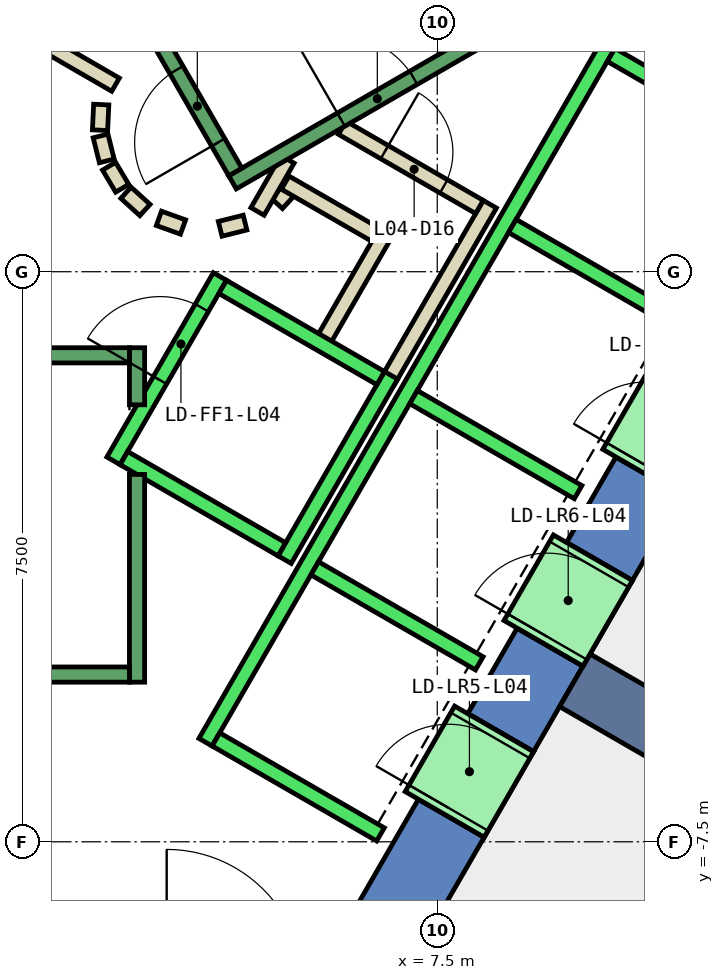
"""IFC4 building model, lengths in metres.
Left out: names, types, materials, properties, quantities, classifications, styles, units other than length and angle.
Written with IfcOpenShell. Run it as: python <this file> out.ifc"""

import sys

from ifc_helpers import new_model, si_unit, direction, frame, frame_2d, origin, place, context, subcontext, project, spatial, polyline, rectangle, outline, extrude, element, fill, save


model = new_model("IFC4")
c1 = context("Model", 3, precision=1e-05, world=origin(), true_north=direction((0.0, 1.0)))
c2 = subcontext(c1, "Body", "Model", "MODEL_VIEW")
j1 = project(units=[si_unit("LENGTHUNIT", "METRE"), si_unit("PLANEANGLEUNIT", "RADIAN")], contexts=[c1])
p1 = place(None, origin())
s1 = spatial("IfcSite", under=j1, at=p1, CompositionType="ELEMENT")
p2 = place(p1, origin())
s2 = spatial("IfcBuilding", under=s1, at=p2, CompositionType="ELEMENT")
p3 = place(p2, frame((0.0, 0.0, 25.0)))
s3 = spatial("IfcBuildingStorey", under=s2, at=p3, CompositionType="ELEMENT", Elevation=25.0)
p4 = place(p3, frame((0.0, 0.0, -0.45)))
e1 = element("IfcWall", 1, at=p4, inside=s3, PredefinedType="SHEAR", context=c2, shape_type="SweptSolid", body=[
    extrude(outline(polyline([(8.517, 11.748), (7.651, 11.248), (12.702, 2.5), (13.856, 2.5), (8.517, 11.748)])), origin(), (0.0, 0.0, 1.0), 5.0),
])
p5 = place(p3, frame((0.0, 0.0, -0.45)))
e2 = element("IfcWall", 2, at=p5, inside=s3, PredefinedType="SHEAR", context=c2, shape_type="SweptSolid", body=[
    extrude(outline(polyline([(8.117, -7.44), (7.252, -6.94), (6.351, -8.5), (6.928, -9.5), (8.117, -7.44)])), origin(), (0.0, 0.0, 1.0), 5.0),
])
p6 = place(p3, frame((0.0, 0.0, -0.45)))
e3 = element("IfcWall", 3, at=p6, inside=s3, PredefinedType="SHEAR", context=c2, shape_type="SweptSolid", body=[
    extrude(outline(polyline([(9.417, -5.189), (8.551, -4.689), (7.902, -5.814), (8.767, -6.314), (9.417, -5.189)])), origin(), (0.0, 0.0, 1.0), 5.0),
])
p7 = place(p3, frame((0.0, 0.0, -0.45)))
e4 = element("IfcWall", 4, at=p7, inside=s3, PredefinedType="SHEAR", context=c2, shape_type="SweptSolid", body=[
    extrude(outline(polyline([(10.717, -2.937), (9.851, -2.437), (9.201, -3.563), (10.067, -4.063), (10.717, -2.937)])), origin(), (0.0, 0.0, 1.0), 5.0),
])
p8 = place(p3, frame((0.0, 0.0, 3.6)))
e5 = element("IfcWall", 5, at=p8, inside=s3, PredefinedType="SHEAR", context=c2, shape_type="SweptSolid", body=[
    extrude(outline(polyline([(8.767, -6.314), (7.902, -5.814), (7.252, -6.94), (8.117, -7.44), (8.767, -6.314)])), origin(), (0.0, 0.0, 1.0), 0.95),
])
p9 = place(p3, frame((0.0, 0.0, 3.6)))
e6 = element("IfcWall", 6, at=p9, inside=s3, PredefinedType="SHEAR", context=c2, shape_type="SweptSolid", body=[
    extrude(outline(polyline([(10.067, -4.063), (9.201, -3.563), (8.551, -4.689), (9.417, -5.189), (10.067, -4.063)])), origin(), (0.0, 0.0, 1.0), 0.95),
])
p10 = place(p3, frame((0.0, 0.0, 3.6)))
e7 = element("IfcWall", 7, at=p10, inside=s3, PredefinedType="SHEAR", context=c2, shape_type="SweptSolid", body=[
    extrude(outline(polyline([(11.367, -1.811), (10.501, -1.311), (9.851, -2.437), (10.717, -2.937), (11.367, -1.811)])), origin(), (0.0, 0.0, 1.0), 0.95),
])
p11 = place(p3, frame((9.31, -5.375, -0.45), z_axis=(0.0, 0.0, 1.0), x_axis=(0.866017533419, -0.500013631625, 0.0)))
e8 = element("IfcWall", 8, at=p11, inside=s3, PredefinedType="SHEAR", context=c2, shape_type="SweptSolid", body=[
    extrude(rectangle(XDim=9.0, YDim=0.8, at=frame_2d((4.5, 0.0))), origin(), (0.0, 0.0, 1.0), 5.0),
])
p12 = place(p3, frame((5.39, 0.898, 0.0), z_axis=(0.0, 0.0, 1.0), x_axis=(0.673828488714, 0.738887791073, 0.0)))
e9 = element("IfcWall", 9, at=p12, inside=s3, PredefinedType="PARTITIONING", context=c2, shape_type="SweptSolid", body=[
    extrude(rectangle(XDim=0.263, YDim=0.2, at=frame_2d((0.131, 0.0))), origin(), (0.0, 0.0, 1.0), 4.55),
])
p13 = place(p3, frame((5.499, 1.172, 0.0), z_axis=(0.0, 0.0, 1.0), x_axis=(0.866333505267, -0.499465972466, 0.0)))
e10 = element("IfcWall", 10, at=p13, inside=s3, PredefinedType="PARTITIONING", context=c2, shape_type="SweptSolid", body=[
    extrude(rectangle(XDim=1.374, YDim=0.2, at=frame_2d((0.687, 0.0))), origin(), (0.0, 0.0, 1.0), 4.55),
])
p14 = place(p3, frame((6.826, 0.522, 0.0), z_axis=(0.0, 0.0, 1.0), x_axis=(-0.500016722714, -0.866015748706, 0.0)))
e11 = element("IfcWall", 11, at=p14, inside=s3, PredefinedType="PARTITIONING", context=c2, shape_type="SweptSolid", body=[
    extrude(rectangle(XDim=1.7, YDim=0.2, at=frame_2d((0.85, 0.0))), origin(), (0.0, 0.0, 1.0), 4.55),
])
p15 = place(p3, frame((8.192, 0.888, 0.0), z_axis=(0.0, 0.0, 1.0), x_axis=(-0.499940625693, -0.866059680843, 0.0)))
e12 = element("IfcWall", 12, at=p15, inside=s3, PredefinedType="PARTITIONING", context=c2, shape_type="SweptSolid", body=[
    extrude(rectangle(XDim=2.68, YDim=0.2, at=frame_2d((1.34, 0.0))), origin(), (0.0, 0.0, 1.0), 4.55),
])
p16 = place(p3, frame((5.135, 0.793, 0.0), z_axis=(0.0, 0.0, 1.0), x_axis=(0.499526442893, 0.866298639529, 0.0)))
e13 = element("IfcWall", 13, at=p16, inside=s3, PredefinedType="PARTITIONING", context=c2, shape_type="SweptSolid", body=[
    extrude(rectangle(XDim=0.791, YDim=0.2, at=frame_2d((0.396, 0.0))), origin(), (0.0, 0.0, 1.0), 4.55),
])
p17 = place(p3, frame((6.25, 1.894, 0.0), z_axis=(0.0, 0.0, 1.0), x_axis=(0.866043184279, -0.499969202016, 0.0)))
e14 = element("IfcWall", 14, at=p17, inside=s3, PredefinedType="PARTITIONING", context=c2, shape_type="SweptSolid", body=[
    extrude(rectangle(XDim=2.084, YDim=0.2, at=frame_2d((1.042, 0.0))), origin(), (0.0, 0.0, 1.0), 4.55),
])
p18 = place(p17, frame((0.642, 0.0, 0.0)))
e15 = element("IfcOpeningElement", 15, at=p18, cuts=e14, PredefinedType="OPENING", context=c2, shape_type="SweptSolid", body=[
    extrude(rectangle(XDim=0.9, YDim=2.1, at=frame_2d((0.45, 1.05))), frame((0.0, 0.11, 0.0), z_axis=(0.0, -1.0, 0.0), x_axis=(1.0, 0.0, 0.0)), (0.0, 0.0, 1.0), 0.22),
])
p19 = place(p3, frame((3.079, 2.199, 0.0), z_axis=(0.0, 0.0, 1.0), x_axis=(-0.047771483479, -0.998858290933, 0.0)))
e16 = element("IfcWall", 16, at=p19, inside=s3, PredefinedType="PARTITIONING", context=c2, shape_type="SweptSolid", body=[
    extrude(rectangle(XDim=0.337, YDim=0.2, at=frame_2d((0.169, 0.0))), origin(), (0.0, 0.0, 1.0), 4.55),
])
p20 = place(p3, frame((3.07, 1.786, 0.0), z_axis=(0.0, 0.0, 1.0), x_axis=(0.242705583207, -0.970099994784, 0.0)))
e17 = element("IfcWall", 17, at=p20, inside=s3, PredefinedType="PARTITIONING", context=c2, shape_type="SweptSolid", body=[
    extrude(rectangle(XDim=0.338, YDim=0.2, at=frame_2d((0.169, 0.0))), origin(), (0.0, 0.0, 1.0), 4.55),
])
for number, where, z_axis, x_axis in (
    (18, (3.182, 1.388, 0.0), (0.0, 0.0, 1.0), (0.512, -0.859, 0.0)),
    (19, (3.404, 1.039, 0.0), (0.0, 0.0, 1.0), (0.74, -0.672, 0.0)),
):
    element("IfcWall", number, at=place(p3, frame(where, z_axis=z_axis, x_axis=x_axis)), inside=s3, PredefinedType="PARTITIONING", context=c2, shape_type="SweptSolid", body=[
        extrude(rectangle(XDim=0.338, YDim=0.2, at=frame_2d((0.169, 0.0))), origin(), (0.0, 0.0, 1.0), 4.55),
    ])
p21 = place(p3, frame((3.838, 0.702, 0.0), z_axis=(0.0, 0.0, 1.0), x_axis=(0.941035081519, -0.338308993895, 0.0)))
e20 = element("IfcWall", 20, at=p21, inside=s3, PredefinedType="PARTITIONING", context=c2, shape_type="SweptSolid", body=[
    extrude(rectangle(XDim=0.337, YDim=0.2, at=frame_2d((0.168, 0.0))), origin(), (0.0, 0.0, 1.0), 4.55),
])
p22 = place(p3, frame((4.644, 0.564, 0.0), z_axis=(0.0, 0.0, 1.0), x_axis=(0.969929076366, 0.243387729394, 0.0)))
e21 = element("IfcWall", 21, at=p22, inside=s3, PredefinedType="PARTITIONING", context=c2, shape_type="SweptSolid", body=[
    extrude(rectangle(XDim=0.337, YDim=0.2, at=frame_2d((0.168, 0.0))), origin(), (0.0, 0.0, 1.0), 4.55),
])
p23 = place(p3, frame((2.012, 3.186, 0.0), z_axis=(0.0, 0.0, 1.0), x_axis=(0.865891012941, -0.500232699559, 0.0)))
e22 = element("IfcWall", 22, at=p23, inside=s3, PredefinedType="PARTITIONING", context=c2, shape_type="SweptSolid", body=[
    extrude(rectangle(XDim=1.449, YDim=0.2, at=frame_2d((0.725, 0.0))), origin(), (0.0, 0.0, 1.0), 4.55),
])
p24 = place(p3, frame((3.24, -2.488, 0.0), z_axis=(0.0, 0.0, 1.0), x_axis=(0.49994636267, 0.866056369097, 0.0)))
e23 = element("IfcWall", 23, at=p24, inside=s3, PredefinedType="STANDARD", context=c2, shape_type="SweptSolid", body=[
    extrude(rectangle(XDim=2.8, YDim=0.2, at=frame_2d((1.4, 0.0))), origin(), (0.0, 0.0, 1.0), 4.55),
])
p25 = place(p24, frame((1.225, 0.0, 0.0)))
e24 = element("IfcOpeningElement", 24, at=p25, cuts=e23, PredefinedType="OPENING", context=c2, shape_type="SweptSolid", body=[
    extrude(rectangle(XDim=1.1, YDim=2.1, at=frame_2d((0.55, 1.05))), frame((0.0, 0.11, 0.0), z_axis=(0.0, -1.0, 0.0), x_axis=(1.0, 0.0, 0.0)), (0.0, 0.0, 1.0), 0.22),
])
p26 = place(p3, frame((5.492, -3.788, 0.0), z_axis=(0.0, 0.0, 1.0), x_axis=(0.500011755427, 0.866018616679, 0.0)))
e25 = element("IfcWall", 25, at=p26, inside=s3, PredefinedType="STANDARD", context=c2, shape_type="SweptSolid", body=[
    extrude(rectangle(XDim=2.8, YDim=0.2, at=frame_2d((1.4, 0.0))), origin(), (0.0, 0.0, 1.0), 4.55),
])
p27 = place(p3, frame((3.377, -2.452, 0.0), z_axis=(0.0, 0.0, 1.0), x_axis=(0.865955154139, -0.50012165622, 0.0)))
e26 = element("IfcWall", 26, at=p27, inside=s3, PredefinedType="STANDARD", context=c2, shape_type="SweptSolid", body=[
    extrude(rectangle(XDim=2.4, YDim=0.2, at=frame_2d((1.2, 0.0))), origin(), (0.0, 0.0, 1.0), 4.55),
])
p28 = place(p3, frame((4.677, -0.2, 0.0), z_axis=(0.0, 0.0, 1.0), x_axis=(0.865973769406, -0.500089422704, 0.0)))
e27 = element("IfcWall", 27, at=p28, inside=s3, PredefinedType="STANDARD", context=c2, shape_type="SweptSolid", body=[
    extrude(rectangle(XDim=2.399, YDim=0.2, at=frame_2d((1.2, 0.0))), origin(), (0.0, 0.0, 1.0), 4.55),
])
p29 = place(p3, frame((4.451, -6.19, 0.0), z_axis=(0.0, 0.0, 1.0), x_axis=(0.50000090737, 0.866024879913, 0.0)))
e28 = element("IfcWall", 28, at=p29, inside=s3, PredefinedType="STANDARD", context=c2, shape_type="SweptSolid", body=[
    extrude(rectangle(XDim=10.6, YDim=0.2, at=frame_2d((5.3, 0.0))), origin(), (0.0, 0.0, 1.0), 4.55),
])
for number, where, z_axis, x_axis in (
    (29, (4.588, -6.153, 0.0), (0.0, 0.0, 1.0), (0.866, -0.5, 0.0)),
    (30, (5.888, -3.902, 0.0), (0.0, 0.0, 1.0), (0.866, -0.5, 0.0)),
    (31, (7.188, -1.65, 0.0), (0.0, 0.0, 1.0), (0.866, -0.5, 0.0)),
    (32, (8.488, 0.602, 0.0), (0.0, 0.0, 1.0), (0.866, -0.5, 0.0)),
):
    element("IfcWall", number, at=place(p3, frame(where, z_axis=z_axis, x_axis=x_axis)), inside=s3, PredefinedType="STANDARD", context=c2, shape_type="SweptSolid", body=[
        extrude(rectangle(XDim=2.5, YDim=0.2, at=frame_2d((1.25, 0.0))), origin(), (0.0, 0.0, 1.0), 4.55),
    ])
p30 = place(p3, frame((9.788, 2.853, 0.0), z_axis=(0.0, 0.0, 1.0), x_axis=(0.865998541277, -0.500046524342, 0.0)))
e33 = element("IfcWall", 33, at=p30, inside=s3, PredefinedType="STANDARD", context=c2, shape_type="SweptSolid", body=[
    extrude(rectangle(XDim=2.5, YDim=0.2, at=frame_2d((1.25, 0.0))), origin(), (0.0, 0.0, 1.0), 4.55),
])
p31 = place(p3, frame((7.598, -7.14, 0.0), z_axis=(0.0, 0.0, 1.0), x_axis=(0.500362116554, 0.865816234728, 0.0)))
e34 = element("IfcWall", 34, at=p31, inside=s3, PredefinedType="STANDARD", context=c2, shape_type="SweptSolid", body=[
    extrude(rectangle(XDim=1.299, YDim=1.2, at=frame_2d((0.65, 0.0))), origin(), (0.0, 0.0, 1.0), 2.4),
])
p32 = place(p31, frame((0.1, 0.0, 0.0)))
e35 = element("IfcOpeningElement", 35, at=p32, cuts=e34, PredefinedType="OPENING", context=c2, shape_type="SweptSolid", body=[
    extrude(rectangle(XDim=1.1, YDim=2.3, at=frame_2d((0.55, 1.15))), frame((0.0, 0.61, 0.0), z_axis=(0.0, -1.0, 0.0), x_axis=(1.0, 0.0, 0.0)), (0.0, 0.0, 1.0), 1.22),
])
p33 = place(p3, frame((8.898, -4.889, 0.0), z_axis=(0.0, 0.0, 1.0), x_axis=(0.500036693733, 0.866004217611, 0.0)))
e36 = element("IfcWall", 36, at=p33, inside=s3, PredefinedType="STANDARD", context=c2, shape_type="SweptSolid", body=[
    extrude(rectangle(XDim=1.3, YDim=1.2, at=frame_2d((0.65, 0.0))), origin(), (0.0, 0.0, 1.0), 2.4),
])
p34 = place(p33, frame((0.1, 0.0, 0.0)))
e37 = element("IfcOpeningElement", 37, at=p34, cuts=e36, PredefinedType="OPENING", context=c2, shape_type="SweptSolid", body=[
    extrude(rectangle(XDim=1.1, YDim=2.3, at=frame_2d((0.55, 1.15))), frame((0.0, 0.61, 0.0), z_axis=(0.0, -1.0, 0.0), x_axis=(1.0, 0.0, 0.0)), (0.0, 0.0, 1.0), 1.22),
])
p35 = place(p3, frame((10.198, -2.637, 0.0), z_axis=(0.0, 0.0, 1.0), x_axis=(0.49989585183, 0.866085525409, 0.0)))
e38 = element("IfcWall", 38, at=p35, inside=s3, PredefinedType="STANDARD", context=c2, shape_type="SweptSolid", body=[
    extrude(rectangle(XDim=1.3, YDim=1.2, at=frame_2d((0.65, 0.0))), origin(), (0.0, 0.0, 1.0), 2.4),
])
p36 = place(p35, frame((0.1, 0.0, 0.0)))
e39 = element("IfcOpeningElement", 39, at=p36, cuts=e38, PredefinedType="OPENING", context=c2, shape_type="SweptSolid", body=[
    extrude(rectangle(XDim=1.1, YDim=2.3, at=frame_2d((0.55, 1.15))), frame((0.0, 0.61, 0.0), z_axis=(0.0, -1.0, 0.0), x_axis=(1.0, 0.0, 0.0)), (0.0, 0.0, 1.0), 1.22),
])
p37 = place(p3, frame((3.55, -2.667, 0.0), z_axis=(0.0, 0.0, 1.0), x_axis=(0.0, -1.0, 0.0)))
e40 = element("IfcWall", 40, at=p37, inside=s3, PredefinedType="STANDARD", context=c2, shape_type="SweptSolid", body=[
    extrude(rectangle(XDim=2.733, YDim=0.2, at=frame_2d((1.366, 0.0))), origin(), (0.0, 0.0, 1.0), 4.55),
])
p38 = place(p3, frame((3.55, -1.0, 0.0), z_axis=(0.0, 0.0, 1.0), x_axis=(0.0, -1.0, 0.0)))
e41 = element("IfcWall", 41, at=p38, inside=s3, PredefinedType="STANDARD", context=c2, shape_type="SweptSolid", body=[
    extrude(rectangle(XDim=0.751, YDim=0.2, at=frame_2d((0.375, 0.0))), origin(), (0.0, 0.0, 1.0), 4.55),
])
p39 = place(p3, frame((-3.45, -1.1, 0.0), z_axis=(0.0, 0.0, 1.0), x_axis=(1.0, 0.0, 0.0)))
e42 = element("IfcWall", 42, at=p39, inside=s3, PredefinedType="STANDARD", context=c2, shape_type="SweptSolid", body=[
    extrude(rectangle(XDim=6.9, YDim=0.2, at=frame_2d((3.45, 0.0))), origin(), (0.0, 0.0, 1.0), 4.55),
])
p40 = place(p39, frame((0.45, 0.0, 0.0)))
e43 = element("IfcOpeningElement", 43, at=p40, cuts=e42, PredefinedType="OPENING", context=c2, shape_type="SweptSolid", body=[
    extrude(rectangle(XDim=1.1, YDim=2.2, at=frame_2d((0.55, 1.1))), frame((0.0, 0.11, 0.0), z_axis=(0.0, -1.0, 0.0), x_axis=(1.0, 0.0, 0.0)), (0.0, 0.0, 1.0), 0.22),
])
p41 = place(p3, frame((-3.45, -5.3, 0.0), z_axis=(0.0, 0.0, 1.0), x_axis=(1.0, 0.0, 0.0)))
e44 = element("IfcWall", 44, at=p41, inside=s3, PredefinedType="STANDARD", context=c2, shape_type="SweptSolid", body=[
    extrude(rectangle(XDim=6.9, YDim=0.2, at=frame_2d((3.45, 0.0))), origin(), (0.0, 0.0, 1.0), 4.55),
])
p42 = place(p3, frame((4.806, 1.176, 0.0), z_axis=(0.0, 0.0, 1.0), x_axis=(0.866059941101, 0.499940174841, 0.0)))
e45 = element("IfcWall", 45, at=p42, inside=s3, PredefinedType="STANDARD", context=c2, shape_type="SweptSolid", body=[
    extrude(rectangle(XDim=4.4, YDim=0.2, at=frame_2d((2.2, 0.0))), origin(), (0.0, 0.0, 1.0), 4.55),
])
p43 = place(p42, frame((1.65, 0.0, 0.0)))
e46 = element("IfcOpeningElement", 46, at=p43, cuts=e45, PredefinedType="OPENING", context=c2, shape_type="SweptSolid", body=[
    extrude(rectangle(XDim=1.1, YDim=2.2, at=frame_2d((0.55, 1.1))), frame((0.0, 0.11, 0.0), z_axis=(0.0, -1.0, 0.0), x_axis=(1.0, 0.0, 0.0)), (0.0, 0.0, 1.0), 0.22),
])
p44 = place(p3, frame((4.843, 1.312, 0.0), z_axis=(0.0, 0.0, 1.0), x_axis=(-0.499963383562, 0.866046543262, 0.0)))
e47 = element("IfcWall", 47, at=p44, inside=s3, PredefinedType="STANDARD", context=c2, shape_type="SweptSolid", body=[
    extrude(rectangle(XDim=6.9, YDim=0.2, at=frame_2d((3.45, 0.0))), origin(), (0.0, 0.0, 1.0), 4.55),
])
p45 = place(p44, frame((0.45, 0.0, 0.0)))
e48 = element("IfcOpeningElement", 48, at=p45, cuts=e47, PredefinedType="OPENING", context=c2, shape_type="SweptSolid", body=[
    extrude(rectangle(XDim=1.1, YDim=2.2, at=frame_2d((0.55, 1.1))), frame((0.0, 0.11, 0.0), z_axis=(0.0, -1.0, 0.0), x_axis=(1.0, 0.0, 0.0)), (0.0, 0.0, 1.0), 0.22),
])
p46 = place(p18, origin())
e49 = element("IfcDoor", 49, at=p46, inside=s3, OperationType="SINGLE_SWING_LEFT", PredefinedType="DOOR", context=c2, shape_type="SweptSolid", body=[
    extrude(rectangle(XDim=0.9, YDim=2.1, at=frame_2d((0.45, 1.05))), frame((0.0, 0.025, 0.0), z_axis=(0.0, -1.0, 0.0), x_axis=(1.0, 0.0, 0.0)), (0.0, 0.0, 1.0), 0.05),
])
fill(e15, e49)
p47 = place(p32, origin())
e50 = element("IfcDoor", 50, at=p47, inside=s3, OperationType="SLIDING_TO_LEFT", PredefinedType="DOOR", context=c2, shape_type="SweptSolid", body=[
    extrude(rectangle(XDim=1.1, YDim=2.3, at=frame_2d((0.55, 1.15))), frame((0.0, 0.025, 0.0), z_axis=(0.0, -1.0, 0.0), x_axis=(1.0, 0.0, 0.0)), (0.0, 0.0, 1.0), 0.05),
])
fill(e35, e50)
p48 = place(p34, origin())
e51 = element("IfcDoor", 51, at=p48, inside=s3, OperationType="SLIDING_TO_LEFT", PredefinedType="DOOR", context=c2, shape_type="SweptSolid", body=[
    extrude(rectangle(XDim=1.1, YDim=2.3, at=frame_2d((0.55, 1.15))), frame((0.0, 0.025, 0.0), z_axis=(0.0, -1.0, 0.0), x_axis=(1.0, 0.0, 0.0)), (0.0, 0.0, 1.0), 0.05),
])
fill(e37, e51)
p49 = place(p25, origin())
e52 = element("IfcDoor", 52, at=p49, inside=s3, OperationType="SLIDING_TO_LEFT", PredefinedType="DOOR", context=c2, shape_type="SweptSolid", body=[
    extrude(rectangle(XDim=1.1, YDim=2.1, at=frame_2d((0.55, 1.05))), frame((0.0, 0.025, 0.0), z_axis=(0.0, -1.0, 0.0), x_axis=(1.0, 0.0, 0.0)), (0.0, 0.0, 1.0), 0.05),
])
fill(e24, e52)
p50 = place(p45, origin())
e53 = element("IfcDoor", 53, at=p50, inside=s3, OperationType="SINGLE_SWING_LEFT", PredefinedType="DOOR", context=c2, shape_type="SweptSolid", body=[
    extrude(rectangle(XDim=1.1, YDim=2.2, at=frame_2d((0.55, 1.1))), frame((0.0, 0.025, 0.0), z_axis=(0.0, -1.0, 0.0), x_axis=(1.0, 0.0, 0.0)), (0.0, 0.0, 1.0), 0.05),
])
fill(e48, e53)
p51 = place(p43, origin())
e54 = element("IfcDoor", 54, at=p51, inside=s3, OperationType="SINGLE_SWING_LEFT", PredefinedType="DOOR", context=c2, shape_type="SweptSolid", body=[
    extrude(rectangle(XDim=1.1, YDim=2.2, at=frame_2d((0.55, 1.1))), frame((0.0, 0.025, 0.0), z_axis=(0.0, -1.0, 0.0), x_axis=(1.0, 0.0, 0.0)), (0.0, 0.0, 1.0), 0.05),
])
fill(e46, e54)
save(model, sys.argv[1])
